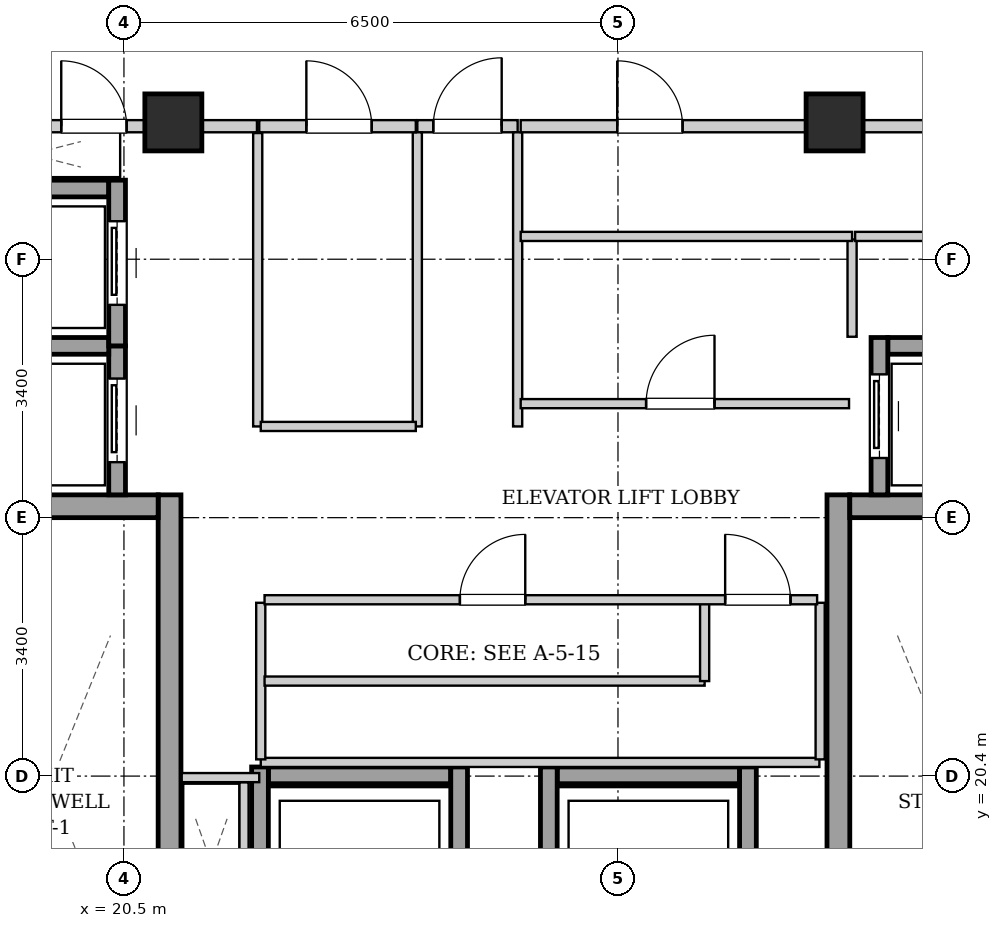
"""IFC4 building model, lengths in metres.
Left out: names, types, materials, properties, quantities, classifications, styles, units other than length and angle.
Written with IfcOpenShell. Run it as: python <this file> out.ifc"""

import sys

from ifc_helpers import new_model, si_unit, direction, frame, frame_2d, origin, origin_2d, place, context, subcontext, project, spatial, rectangle, extrude, element, fill, save


model = new_model("IFC4")
c1 = context("Model", 3, precision=1e-05, world=origin(), true_north=direction((0.0, 1.0)))
c2 = subcontext(c1, "Body", "Model", "MODEL_VIEW")
j1 = project(units=[si_unit("LENGTHUNIT", "METRE"), si_unit("PLANEANGLEUNIT", "RADIAN")], contexts=[c1])
p1 = place(None, origin())
s1 = spatial("IfcSite", under=j1, at=p1, CompositionType="ELEMENT")
p2 = place(p1, origin())
s2 = spatial("IfcBuilding", under=s1, at=p2, CompositionType="ELEMENT")
p3 = place(p2, frame((0.0, 0.0, 258.1)))
s3 = spatial("IfcBuildingStorey", under=s2, at=p3, CompositionType="ELEMENT", Elevation=258.1)
for number, where, z_axis, x_axis in (
    (1, (21.15, 29.0, 0.0), (0.0, 0.0, 1.0), (1.0, 0.0, 0.0)),
    (2, (29.85, 29.0, 0.0), (0.0, 0.0, 1.0), (1.0, 0.0, 0.0)),
):
    element("IfcColumn", number, at=place(p3, frame(where, z_axis=z_axis, x_axis=x_axis)), inside=s3, PredefinedType="COLUMN", context=c2, shape_type="SweptSolid", body=[
        extrude(rectangle(XDim=0.75, YDim=0.75, at=origin_2d()), origin(), (0.0, 0.0, 1.0), 3.4),
    ])
p4 = place(p3, frame((21.1, 15.1, 0.0), z_axis=(0.0, 0.0, 1.0), x_axis=(0.0, 1.0, 0.0)))
e3 = element("IfcWall", 3, at=p4, inside=s3, PredefinedType="SHEAR", context=c2, shape_type="SweptSolid", body=[
    extrude(rectangle(XDim=9.0, YDim=0.3, at=frame_2d((4.5, 0.0))), origin(), (0.0, 0.0, 1.0), 3.05),
])
p5 = place(p3, frame((18.1, 23.95, 0.0), z_axis=(0.0, 0.0, 1.0), x_axis=(1.0, 0.0, 0.0)))
e4 = element("IfcWall", 4, at=p5, inside=s3, PredefinedType="SHEAR", context=c2, shape_type="SweptSolid", body=[
    extrude(rectangle(XDim=2.85, YDim=0.3, at=frame_2d((1.425, 0.0))), origin(), (0.0, 0.0, 1.0), 3.05),
])
p6 = place(p3, frame((29.9, 15.1, 0.0), z_axis=(0.0, 0.0, 1.0), x_axis=(0.0, 1.0, 0.0)))
e5 = element("IfcWall", 5, at=p6, inside=s3, PredefinedType="SHEAR", context=c2, shape_type="SweptSolid", body=[
    extrude(rectangle(XDim=9.0, YDim=0.3, at=frame_2d((4.5, 0.0))), origin(), (0.0, 0.0, 1.0), 3.05),
])
p7 = place(p3, frame((30.05, 23.95, 0.0), z_axis=(0.0, 0.0, 1.0), x_axis=(1.0, 0.0, 0.0)))
e6 = element("IfcWall", 6, at=p7, inside=s3, PredefinedType="SHEAR", context=c2, shape_type="SweptSolid", body=[
    extrude(rectangle(XDim=2.85, YDim=0.3, at=frame_2d((1.425, 0.0))), origin(), (0.0, 0.0, 1.0), 3.05),
])
p8 = place(p3, frame((20.41, 24.1, 0.0), z_axis=(0.0, 0.0, 1.0), x_axis=(0.0, 1.0, 0.0)))
e7 = element("IfcWall", 7, at=p8, inside=s3, PredefinedType="SHEAR", context=c2, shape_type="SweptSolid", body=[
    extrude(rectangle(XDim=1.96, YDim=0.22, at=frame_2d((0.98, 0.0))), origin(), (0.0, 0.0, 1.0), 3.05),
])
p9 = place(p8, frame((0.43, 0.0, 0.0)))
e8 = element("IfcOpeningElement", 8, at=p9, cuts=e7, PredefinedType="OPENING", context=c2, shape_type="SweptSolid", body=[
    extrude(rectangle(XDim=1.1, YDim=2.15, at=frame_2d((0.55, 1.075))), frame((0.0, 0.12, 0.0), z_axis=(0.0, -1.0, 0.0), x_axis=(1.0, 0.0, 0.0)), (0.0, 0.0, 1.0), 0.24),
])
for number, where, z_axis, x_axis in (
    (9, (18.4, 26.06, 0.0), (0.0, 0.0, 1.0), (1.0, 0.0, 0.0)),
    (10, (18.4, 28.13, 0.0), (0.0, 0.0, 1.0), (1.0, 0.0, 0.0)),
):
    element("IfcWall", number, at=place(p3, frame(where, z_axis=z_axis, x_axis=x_axis)), inside=s3, PredefinedType="SHEAR", context=c2, shape_type="SweptSolid", body=[
        extrude(rectangle(XDim=1.9, YDim=0.22, at=frame_2d((0.95, 0.0))), origin(), (0.0, 0.0, 1.0), 3.05),
    ])
p10 = place(p3, frame((20.41, 26.06, 0.0), z_axis=(0.0, 0.0, 1.0), x_axis=(0.0, 1.0, 0.0)))
e11 = element("IfcWall", 11, at=p10, inside=s3, PredefinedType="SHEAR", context=c2, shape_type="SweptSolid", body=[
    extrude(rectangle(XDim=2.18, YDim=0.22, at=frame_2d((1.09, 0.0))), origin(), (0.0, 0.0, 1.0), 3.05),
])
p11 = place(p10, frame((0.54, 0.0, 0.0)))
e12 = element("IfcOpeningElement", 12, at=p11, cuts=e11, PredefinedType="OPENING", context=c2, shape_type="SweptSolid", body=[
    extrude(rectangle(XDim=1.1, YDim=2.15, at=frame_2d((0.55, 1.075))), frame((0.0, 0.12, 0.0), z_axis=(0.0, -1.0, 0.0), x_axis=(1.0, 0.0, 0.0)), (0.0, 0.0, 1.0), 0.24),
])
p12 = place(p3, frame((30.55, 26.06, 0.0), z_axis=(0.0, 0.0, 1.0), x_axis=(1.0, 0.0, 0.0)))
e13 = element("IfcWall", 13, at=p12, inside=s3, PredefinedType="SHEAR", context=c2, shape_type="SweptSolid", body=[
    extrude(rectangle(XDim=1.9, YDim=0.22, at=frame_2d((0.95, 0.0))), origin(), (0.0, 0.0, 1.0), 3.05),
])
p13 = place(p3, frame((30.44, 24.1, 0.0), z_axis=(0.0, 0.0, 1.0), x_axis=(0.0, 1.0, 0.0)))
e14 = element("IfcWall", 14, at=p13, inside=s3, PredefinedType="SHEAR", context=c2, shape_type="SweptSolid", body=[
    extrude(rectangle(XDim=2.07, YDim=0.22, at=frame_2d((1.035, 0.0))), origin(), (0.0, 0.0, 1.0), 3.05),
])
p14 = place(p13, frame((0.485, 0.0, 0.0)))
e15 = element("IfcOpeningElement", 15, at=p14, cuts=e14, PredefinedType="OPENING", context=c2, shape_type="SweptSolid", body=[
    extrude(rectangle(XDim=1.1, YDim=2.15, at=frame_2d((0.55, 1.075))), frame((0.0, 0.12, 0.0), z_axis=(0.0, -1.0, 0.0), x_axis=(1.0, 0.0, 0.0)), (0.0, 0.0, 1.0), 0.24),
])
p15 = place(p3, frame((22.4, 20.41, 0.0), z_axis=(0.0, 0.0, 1.0), x_axis=(1.0, 0.0, 0.0)))
e16 = element("IfcWall", 16, at=p15, inside=s3, PredefinedType="SHEAR", context=c2, shape_type="SweptSolid", body=[
    extrude(rectangle(XDim=2.4, YDim=0.22, at=frame_2d((1.2, 0.0))), origin(), (0.0, 0.0, 1.0), 3.05),
])
for number, where, z_axis, x_axis in (
    (17, (22.29, 17.98, 0.0), (0.0, 0.0, 1.0), (0.0, 1.0, 0.0)),
    (18, (24.91, 17.98, 0.0), (0.0, 0.0, 1.0), (0.0, 1.0, 0.0)),
):
    element("IfcWall", number, at=place(p3, frame(where, z_axis=z_axis, x_axis=x_axis)), inside=s3, PredefinedType="SHEAR", context=c2, shape_type="SweptSolid", body=[
        extrude(rectangle(XDim=2.54, YDim=0.22, at=frame_2d((1.27, 0.0))), origin(), (0.0, 0.0, 1.0), 3.05),
    ])
p16 = place(p3, frame((26.2, 20.41, 0.0), z_axis=(0.0, 0.0, 1.0), x_axis=(1.0, 0.0, 0.0)))
e19 = element("IfcWall", 19, at=p16, inside=s3, PredefinedType="SHEAR", context=c2, shape_type="SweptSolid", body=[
    extrude(rectangle(XDim=2.4, YDim=0.22, at=frame_2d((1.2, 0.0))), origin(), (0.0, 0.0, 1.0), 3.05),
])
for number, where, z_axis, x_axis in (
    (20, (26.09, 17.98, 0.0), (0.0, 0.0, 1.0), (0.0, 1.0, 0.0)),
    (21, (28.71, 17.98, 0.0), (0.0, 0.0, 1.0), (0.0, 1.0, 0.0)),
):
    element("IfcWall", number, at=place(p3, frame(where, z_axis=z_axis, x_axis=x_axis)), inside=s3, PredefinedType="SHEAR", context=c2, shape_type="SweptSolid", body=[
        extrude(rectangle(XDim=2.54, YDim=0.22, at=frame_2d((1.27, 0.0))), origin(), (0.0, 0.0, 1.0), 3.05),
    ])
p17 = place(p3, frame((24.36, 28.95, 0.0), z_axis=(0.0, 0.0, 1.0), x_axis=(1.0, 0.0, 0.0)))
e22 = element("IfcWall", 22, at=p17, inside=s3, PredefinedType="PARTITIONING", context=c2, shape_type="SweptSolid", body=[
    extrude(rectangle(XDim=1.32, YDim=0.16, at=frame_2d((0.66, 0.0))), origin(), (0.0, 0.0, 1.0), 2.578),
])
p18 = place(p17, frame((0.21, 0.0, 0.0)))
e23 = element("IfcOpeningElement", 23, at=p18, cuts=e22, PredefinedType="OPENING", context=c2, shape_type="SweptSolid", body=[
    extrude(rectangle(XDim=0.9, YDim=2.05, at=frame_2d((0.45, 1.025))), frame((0.0, 0.09, 0.0), z_axis=(0.0, -1.0, 0.0), x_axis=(1.0, 0.0, 0.0)), (0.0, 0.0, 1.0), 0.18),
])
p19 = place(p3, frame((17.96, 28.95, 0.0), z_axis=(0.0, 0.0, 1.0), x_axis=(1.0, 0.0, 0.0)))
e24 = element("IfcWall", 24, at=p19, inside=s3, PredefinedType="PARTITIONING", context=c2, shape_type="SweptSolid", body=[
    extrude(rectangle(XDim=4.29, YDim=0.16, at=frame_2d((2.145, 0.0))), origin(), (0.0, 0.0, 1.0), 2.578),
])
p20 = place(p19, frame((1.715, 0.0, 0.0)))
e25 = element("IfcOpeningElement", 25, at=p20, cuts=e24, PredefinedType="OPENING", context=c2, shape_type="SweptSolid", body=[
    extrude(rectangle(XDim=0.86, YDim=2.05, at=frame_2d((0.43, 1.025))), frame((0.0, 0.09, 0.0), z_axis=(0.0, -1.0, 0.0), x_axis=(1.0, 0.0, 0.0)), (0.0, 0.0, 1.0), 0.18),
])
p21 = place(p3, frame((22.08, 18.2, 0.0), z_axis=(0.0, 0.0, 1.0), x_axis=(0.0, 1.0, 0.0)))
e26 = element("IfcWall", 26, at=p21, inside=s3, PredefinedType="PARTITIONING", context=c2, shape_type="SweptSolid", body=[
    extrude(rectangle(XDim=2.12, YDim=0.12, at=frame_2d((1.06, 0.0))), origin(), (0.0, 0.0, 1.0), 3.05),
])
p22 = place(p3, frame((22.28, 20.38, 0.0), z_axis=(0.0, 0.0, 1.0), x_axis=(-1.0, 0.0, 0.0)))
e27 = element("IfcWall", 27, at=p22, inside=s3, PredefinedType="PARTITIONING", context=c2, shape_type="SweptSolid", body=[
    extrude(rectangle(XDim=1.02, YDim=0.12, at=frame_2d((0.51, 0.0))), origin(), (0.0, 0.0, 1.0), 3.05),
])
for number, where, z_axis, x_axis in (
    (28, (24.36, 25.0, 0.0), (0.0, 0.0, 1.0), (0.0, 1.0, 0.0)),
    (29, (25.68, 25.0, 0.0), (0.0, 0.0, 1.0), (0.0, 1.0, 0.0)),
):
    element("IfcWall", number, at=place(p3, frame(where, z_axis=z_axis, x_axis=x_axis)), inside=s3, PredefinedType="PARTITIONING", context=c2, shape_type="SweptSolid", body=[
        extrude(rectangle(XDim=3.87, YDim=0.12, at=frame_2d((1.935, 0.0))), origin(), (0.0, 0.0, 1.0), 3.05),
    ])
p23 = place(p3, frame((30.08, 26.18, 0.0), z_axis=(0.0, 0.0, 1.0), x_axis=(0.0, 1.0, 0.0)))
e30 = element("IfcWall", 30, at=p23, inside=s3, PredefinedType="PARTITIONING", context=c2, shape_type="SweptSolid", body=[
    extrude(rectangle(XDim=1.28, YDim=0.12, at=frame_2d((0.64, 0.0))), origin(), (0.0, 0.0, 1.0), 3.05),
])
p24 = place(p3, frame((30.12, 27.5, 0.0), z_axis=(0.0, 0.0, 1.0), x_axis=(1.0, 0.0, 0.0)))
e31 = element("IfcWall", 31, at=p24, inside=s3, PredefinedType="PARTITIONING", context=c2, shape_type="SweptSolid", body=[
    extrude(rectangle(XDim=2.92, YDim=0.12, at=frame_2d((1.46, 0.0))), origin(), (0.0, 0.0, 1.0), 3.05),
])
p25 = place(p24, frame((0.97, 0.0, 0.0)))
e32 = element("IfcOpeningElement", 32, at=p25, cuts=e31, PredefinedType="OPENING", context=c2, shape_type="SweptSolid", body=[
    extrude(rectangle(XDim=0.86, YDim=2.05, at=frame_2d((0.43, 1.025))), frame((0.0, 0.07, 0.0), z_axis=(0.0, -1.0, 0.0), x_axis=(1.0, 0.0, 0.0)), (0.0, 0.0, 1.0), 0.14),
])
p26 = place(p3, frame((22.26, 25.0, 0.0), z_axis=(0.0, 0.0, 1.0), x_axis=(0.0, 1.0, 0.0)))
e33 = element("IfcWall", 33, at=p26, inside=s3, PredefinedType="PARTITIONING", context=c2, shape_type="SweptSolid", body=[
    extrude(rectangle(XDim=3.86, YDim=0.12, at=frame_2d((1.93, 0.0))), origin(), (0.0, 0.0, 1.0), 3.05),
])
p27 = place(p3, frame((22.3, 25.0, 0.0), z_axis=(0.0, 0.0, 1.0), x_axis=(1.0, 0.0, 0.0)))
e34 = element("IfcWall", 34, at=p27, inside=s3, PredefinedType="PARTITIONING", context=c2, shape_type="SweptSolid", body=[
    extrude(rectangle(XDim=2.04, YDim=0.12, at=frame_2d((1.02, 0.0))), origin(), (0.0, 0.0, 1.0), 3.05),
])
p28 = place(p3, frame((22.28, 28.95, 0.0), z_axis=(0.0, 0.0, 1.0), x_axis=(1.0, 0.0, 0.0)))
e35 = element("IfcWall", 35, at=p28, inside=s3, PredefinedType="PARTITIONING", context=c2, shape_type="SweptSolid", body=[
    extrude(rectangle(XDim=2.06, YDim=0.16, at=frame_2d((1.03, 0.0))), origin(), (0.0, 0.0, 1.0), 2.578),
])
p29 = place(p28, frame((0.62, 0.0, 0.0)))
e36 = element("IfcOpeningElement", 36, at=p29, cuts=e35, PredefinedType="OPENING", context=c2, shape_type="SweptSolid", body=[
    extrude(rectangle(XDim=0.86, YDim=2.05, at=frame_2d((0.43, 1.025))), frame((0.0, 0.09, 0.0), z_axis=(0.0, -1.0, 0.0), x_axis=(1.0, 0.0, 0.0)), (0.0, 0.0, 1.0), 0.18),
])
p30 = place(p3, frame((25.72, 27.5, 0.0), z_axis=(0.0, 0.0, 1.0), x_axis=(1.0, 0.0, 0.0)))
e37 = element("IfcWall", 37, at=p30, inside=s3, PredefinedType="PARTITIONING", context=c2, shape_type="SweptSolid", body=[
    extrude(rectangle(XDim=4.36, YDim=0.12, at=frame_2d((2.18, 0.0))), origin(), (0.0, 0.0, 1.0), 3.05),
])
p31 = place(p3, frame((25.72, 25.3, 0.0), z_axis=(0.0, 0.0, 1.0), x_axis=(1.0, 0.0, 0.0)))
e38 = element("IfcWall", 38, at=p31, inside=s3, PredefinedType="PARTITIONING", context=c2, shape_type="SweptSolid", body=[
    extrude(rectangle(XDim=4.32, YDim=0.12, at=frame_2d((2.16, 0.0))), origin(), (0.0, 0.0, 1.0), 3.05),
])
p32 = place(p31, frame((1.65, 0.0, 0.0)))
e39 = element("IfcOpeningElement", 39, at=p32, cuts=e38, PredefinedType="OPENING", context=c2, shape_type="SweptSolid", body=[
    extrude(rectangle(XDim=0.9, YDim=2.05, at=frame_2d((0.45, 1.025))), frame((0.0, 0.07, 0.0), z_axis=(0.0, -1.0, 0.0), x_axis=(1.0, 0.0, 0.0)), (0.0, 0.0, 1.0), 0.14),
])
p33 = place(p3, frame((25.72, 28.95, 0.0), z_axis=(0.0, 0.0, 1.0), x_axis=(1.0, 0.0, 0.0)))
e40 = element("IfcWall", 40, at=p33, inside=s3, PredefinedType="PARTITIONING", context=c2, shape_type="SweptSolid", body=[
    extrude(rectangle(XDim=7.32, YDim=0.16, at=frame_2d((3.66, 0.0))), origin(), (0.0, 0.0, 1.0), 2.578),
])
p34 = place(p33, frame((1.27, 0.0, 0.0)))
e41 = element("IfcOpeningElement", 41, at=p34, cuts=e40, PredefinedType="OPENING", context=c2, shape_type="SweptSolid", body=[
    extrude(rectangle(XDim=0.86, YDim=2.05, at=frame_2d((0.43, 1.025))), frame((0.0, 0.09, 0.0), z_axis=(0.0, -1.0, 0.0), x_axis=(1.0, 0.0, 0.0)), (0.0, 0.0, 1.0), 0.18),
])
p35 = place(p3, frame((22.3, 20.58, 0.0), z_axis=(0.0, 0.0, 1.0), x_axis=(1.0, 0.0, 0.0)))
e42 = element("IfcWall", 42, at=p35, inside=s3, PredefinedType="PARTITIONING", context=c2, shape_type="SweptSolid", body=[
    extrude(rectangle(XDim=7.35, YDim=0.12, at=frame_2d((3.675, 0.0))), origin(), (0.0, 0.0, 1.0), 3.05),
])
for number, where, z_axis, x_axis in (
    (43, (22.3, 20.62, 0.0), (0.0, 0.0, 1.0), (0.0, 1.0, 0.0)),
    (44, (29.66, 20.62, 0.0), (0.0, 0.0, 1.0), (0.0, 1.0, 0.0)),
):
    element("IfcWall", number, at=place(p3, frame(where, z_axis=z_axis, x_axis=x_axis)), inside=s3, PredefinedType="PARTITIONING", context=c2, shape_type="SweptSolid", body=[
        extrude(rectangle(XDim=2.06, YDim=0.12, at=frame_2d((1.03, 0.0))), origin(), (0.0, 0.0, 1.0), 3.05),
    ])
p36 = place(p3, frame((22.35, 21.65, 0.0), z_axis=(0.0, 0.0, 1.0), x_axis=(1.0, 0.0, 0.0)))
e45 = element("IfcWall", 45, at=p36, inside=s3, PredefinedType="PARTITIONING", context=c2, shape_type="SweptSolid", body=[
    extrude(rectangle(XDim=5.79, YDim=0.12, at=frame_2d((2.895, 0.0))), origin(), (0.0, 0.0, 1.0), 3.05),
])
p37 = place(p3, frame((28.14, 21.65, 0.0), z_axis=(0.0, 0.0, 1.0), x_axis=(0.0, 1.0, 0.0)))
e46 = element("IfcWall", 46, at=p37, inside=s3, PredefinedType="PARTITIONING", context=c2, shape_type="SweptSolid", body=[
    extrude(rectangle(XDim=1.03, YDim=0.12, at=frame_2d((0.515, 0.0))), origin(), (0.0, 0.0, 1.0), 3.05),
])
p38 = place(p3, frame((22.35, 22.72, 0.0), z_axis=(0.0, 0.0, 1.0), x_axis=(1.0, 0.0, 0.0)))
e47 = element("IfcWall", 47, at=p38, inside=s3, PredefinedType="PARTITIONING", context=c2, shape_type="SweptSolid", body=[
    extrude(rectangle(XDim=7.27, YDim=0.12, at=frame_2d((3.635, 0.0))), origin(), (0.0, 0.0, 1.0), 3.05),
])
p39 = place(p38, frame((2.57, 0.0, 0.0)))
e48 = element("IfcOpeningElement", 48, at=p39, cuts=e47, PredefinedType="OPENING", context=c2, shape_type="SweptSolid", body=[
    extrude(rectangle(XDim=0.86, YDim=2.05, at=frame_2d((0.43, 1.025))), frame((0.0, 0.07, 0.0), z_axis=(0.0, -1.0, 0.0), x_axis=(1.0, 0.0, 0.0)), (0.0, 0.0, 1.0), 0.14),
])
p40 = place(p38, frame((6.06, 0.0, 0.0)))
e49 = element("IfcOpeningElement", 49, at=p40, cuts=e47, PredefinedType="OPENING", context=c2, shape_type="SweptSolid", body=[
    extrude(rectangle(XDim=0.86, YDim=2.05, at=frame_2d((0.43, 1.025))), frame((0.0, 0.07, 0.0), z_axis=(0.0, -1.0, 0.0), x_axis=(1.0, 0.0, 0.0)), (0.0, 0.0, 1.0), 0.14),
])
p41 = place(p9, origin())
e50 = element("IfcDoor", 50, at=p41, inside=s3, OperationType="SLIDING_TO_LEFT", PredefinedType="DOOR", context=c2, shape_type="SweptSolid", body=[
    extrude(rectangle(XDim=1.1, YDim=2.15, at=frame_2d((0.55, 1.075))), frame((0.0, 0.025, 0.0), z_axis=(0.0, -1.0, 0.0), x_axis=(1.0, 0.0, 0.0)), (0.0, 0.0, 1.0), 0.05),
])
fill(e8, e50)
p42 = place(p11, origin())
e51 = element("IfcDoor", 51, at=p42, inside=s3, OperationType="SLIDING_TO_LEFT", PredefinedType="DOOR", context=c2, shape_type="SweptSolid", body=[
    extrude(rectangle(XDim=1.1, YDim=2.15, at=frame_2d((0.55, 1.075))), frame((0.0, 0.025, 0.0), z_axis=(0.0, -1.0, 0.0), x_axis=(1.0, 0.0, 0.0)), (0.0, 0.0, 1.0), 0.05),
])
fill(e12, e51)
p43 = place(p14, origin())
e52 = element("IfcDoor", 52, at=p43, inside=s3, OperationType="SLIDING_TO_LEFT", PredefinedType="DOOR", context=c2, shape_type="SweptSolid", body=[
    extrude(rectangle(XDim=1.1, YDim=2.15, at=frame_2d((0.55, 1.075))), frame((0.0, 0.025, 0.0), z_axis=(0.0, -1.0, 0.0), x_axis=(1.0, 0.0, 0.0)), (0.0, 0.0, 1.0), 0.05),
])
fill(e15, e52)
p44 = place(p18, origin())
e53 = element("IfcDoor", 53, at=p44, inside=s3, OperationType="SINGLE_SWING_RIGHT", PredefinedType="DOOR", context=c2, shape_type="SweptSolid", body=[
    extrude(rectangle(XDim=0.9, YDim=2.05, at=frame_2d((0.45, 1.025))), frame((0.0, 0.025, 0.0), z_axis=(0.0, -1.0, 0.0), x_axis=(1.0, 0.0, 0.0)), (0.0, 0.0, 1.0), 0.05),
])
fill(e23, e53)
p45 = place(p20, origin())
e54 = element("IfcDoor", 54, at=p45, inside=s3, OperationType="SINGLE_SWING_LEFT", PredefinedType="DOOR", context=c2, shape_type="SweptSolid", body=[
    extrude(rectangle(XDim=0.86, YDim=2.05, at=frame_2d((0.43, 1.025))), frame((0.0, 0.025, 0.0), z_axis=(0.0, -1.0, 0.0), x_axis=(1.0, 0.0, 0.0)), (0.0, 0.0, 1.0), 0.05),
])
fill(e25, e54)
p46 = place(p29, origin())
e55 = element("IfcDoor", 55, at=p46, inside=s3, OperationType="SINGLE_SWING_LEFT", PredefinedType="DOOR", context=c2, shape_type="SweptSolid", body=[
    extrude(rectangle(XDim=0.86, YDim=2.05, at=frame_2d((0.43, 1.025))), frame((0.0, 0.025, 0.0), z_axis=(0.0, -1.0, 0.0), x_axis=(1.0, 0.0, 0.0)), (0.0, 0.0, 1.0), 0.05),
])
fill(e36, e55)
p47 = place(p32, origin())
e56 = element("IfcDoor", 56, at=p47, inside=s3, OperationType="SINGLE_SWING_RIGHT", PredefinedType="DOOR", context=c2, shape_type="SweptSolid", body=[
    extrude(rectangle(XDim=0.9, YDim=2.05, at=frame_2d((0.45, 1.025))), frame((0.0, 0.025, 0.0), z_axis=(0.0, -1.0, 0.0), x_axis=(1.0, 0.0, 0.0)), (0.0, 0.0, 1.0), 0.05),
])
fill(e39, e56)
p48 = place(p34, origin())
e57 = element("IfcDoor", 57, at=p48, inside=s3, OperationType="SINGLE_SWING_LEFT", PredefinedType="DOOR", context=c2, shape_type="SweptSolid", body=[
    extrude(rectangle(XDim=0.86, YDim=2.05, at=frame_2d((0.43, 1.025))), frame((0.0, 0.025, 0.0), z_axis=(0.0, -1.0, 0.0), x_axis=(1.0, 0.0, 0.0)), (0.0, 0.0, 1.0), 0.05),
])
fill(e41, e57)
p49 = place(p39, origin())
e58 = element("IfcDoor", 58, at=p49, inside=s3, OperationType="SINGLE_SWING_RIGHT", PredefinedType="DOOR", context=c2, shape_type="SweptSolid", body=[
    extrude(rectangle(XDim=0.86, YDim=2.05, at=frame_2d((0.43, 1.025))), frame((0.0, 0.025, 0.0), z_axis=(0.0, -1.0, 0.0), x_axis=(1.0, 0.0, 0.0)), (0.0, 0.0, 1.0), 0.05),
])
fill(e48, e58)
p50 = place(p40, origin())
e59 = element("IfcDoor", 59, at=p50, inside=s3, OperationType="SINGLE_SWING_LEFT", PredefinedType="DOOR", context=c2, shape_type="SweptSolid", body=[
    extrude(rectangle(XDim=0.86, YDim=2.05, at=frame_2d((0.43, 1.025))), frame((0.0, 0.025, 0.0), z_axis=(0.0, -1.0, 0.0), x_axis=(1.0, 0.0, 0.0)), (0.0, 0.0, 1.0), 0.05),
])
fill(e49, e59)
save(model, sys.argv[1])
